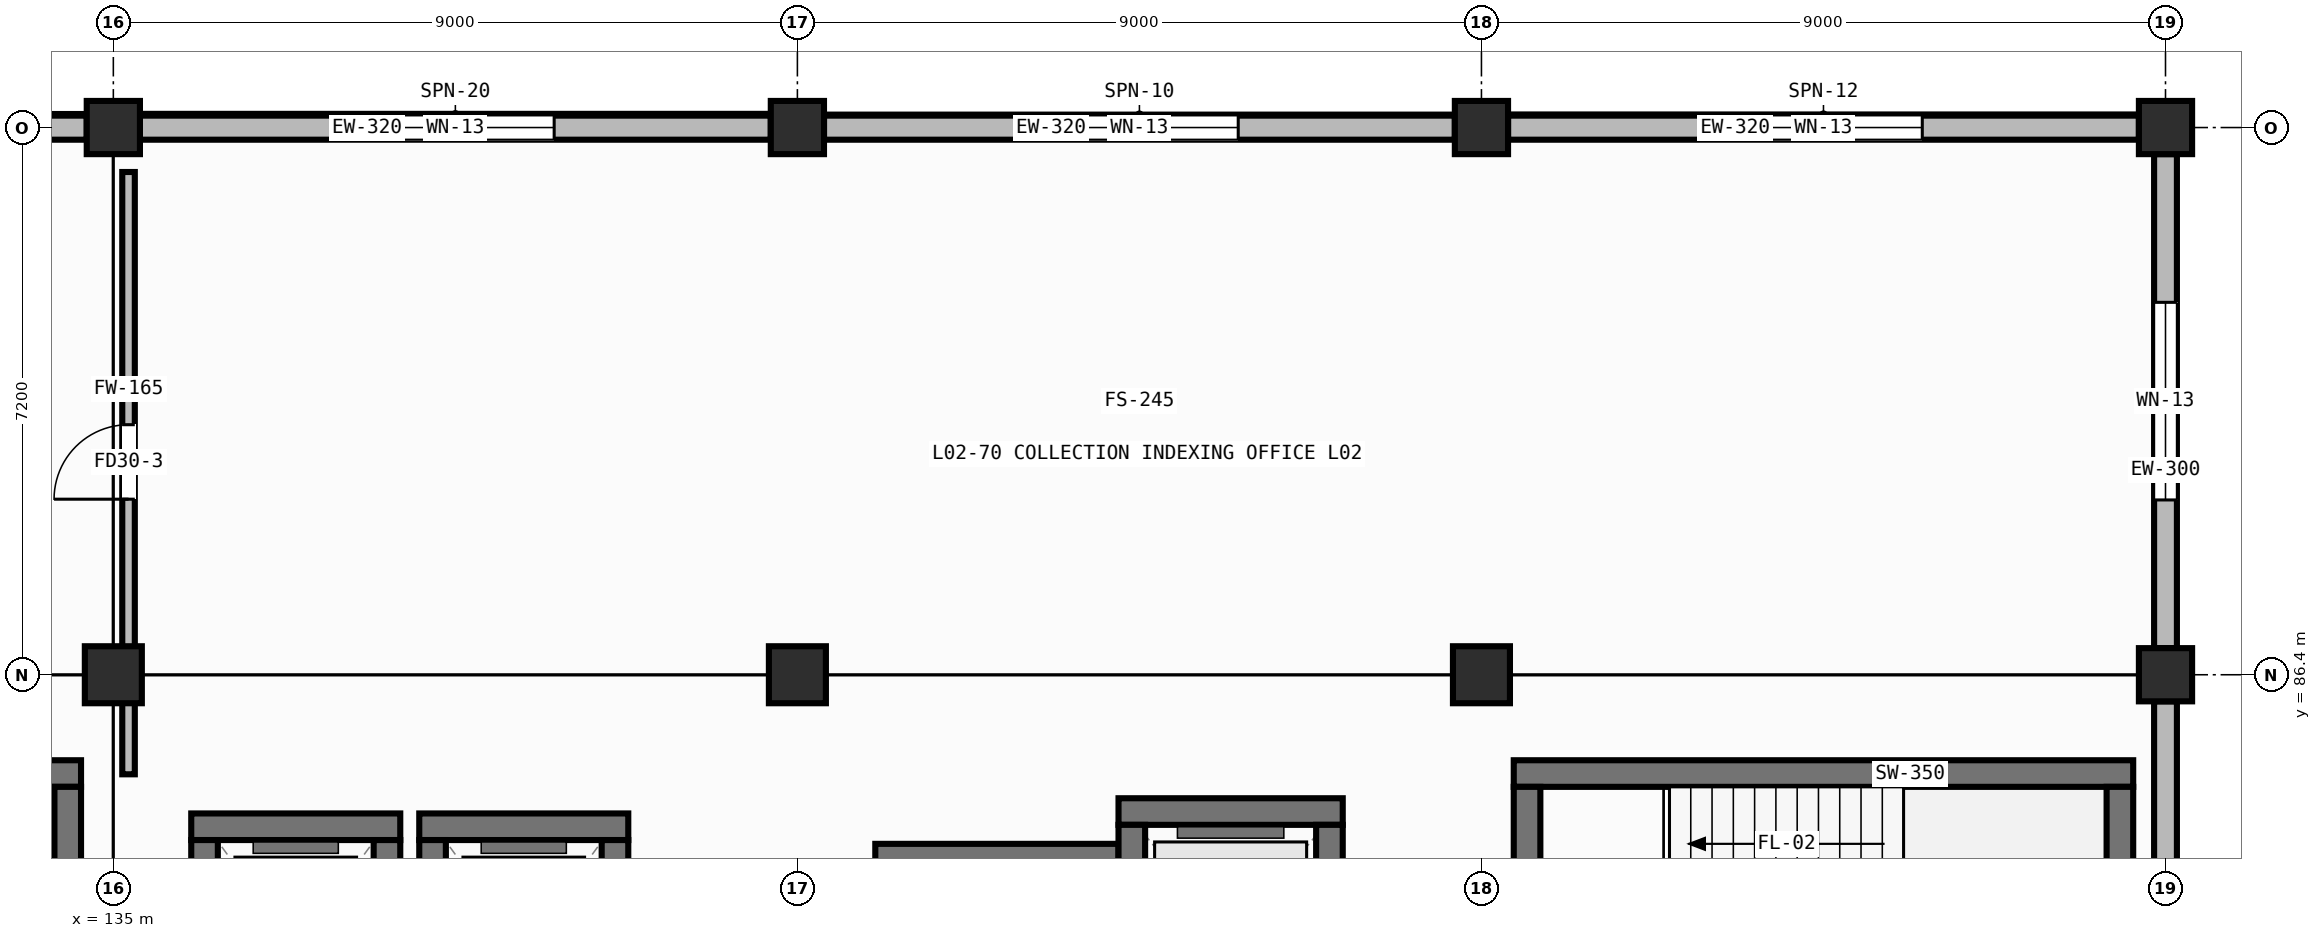
"""IFC4 building model, lengths in metres.
Left out: names, types, materials, properties, quantities, classifications, styles, units other than length and angle.
Written with IfcOpenShell. Run it as: python <this file> out.ifc"""

import sys

from ifc_helpers import new_model, si_unit, direction, frame, frame_2d, origin, origin_2d, place, context, subcontext, project, spatial, rectangle, hollow_rectangle, extrude, element, fill, save


model = new_model("IFC4")
c1 = context("Model", 3, precision=1e-05, world=origin(), true_north=direction((0.0, 1.0)))
c2 = subcontext(c1, "Body", "Model", "MODEL_VIEW")
j1 = project(units=[si_unit("LENGTHUNIT", "METRE"), si_unit("PLANEANGLEUNIT", "RADIAN")], contexts=[c1])
p1 = place(None, origin())
s1 = spatial("IfcSite", under=j1, at=p1, CompositionType="ELEMENT")
p2 = place(p1, origin())
s2 = spatial("IfcBuilding", under=s1, at=p2, CompositionType="ELEMENT")
p3 = place(p2, frame((0.0, 0.0, 4.8)))
s3 = spatial("IfcBuildingStorey", under=s2, at=p3, CompositionType="ELEMENT", Elevation=4.8)
p4 = place(p3, frame((135.0, 86.4, 0.0), z_axis=(0.0, 0.0, 1.0), x_axis=(1.0, 0.0, 0.0)))
e1 = element("IfcColumn", 1, at=p4, inside=s3, PredefinedType="COLUMN", context=c2, shape_type="SweptSolid", body=[
    extrude(hollow_rectangle(XDim=0.75, YDim=0.75, WallThickness=0.032, at=origin_2d()), origin(), (0.0, 0.0, 1.0), 4.0),
])
p5 = place(p3, frame((135.0, 93.6, 0.0), z_axis=(0.0, 0.0, 1.0), x_axis=(1.0, 0.0, 0.0)))
e2 = element("IfcColumn", 2, at=p5, inside=s3, PredefinedType="COLUMN", context=c2, shape_type="SweptSolid", body=[
    extrude(hollow_rectangle(XDim=0.7, YDim=0.7, WallThickness=0.028, at=origin_2d()), origin(), (0.0, 0.0, 1.0), 4.0),
])
p6 = place(p3, frame((144.0, 86.4, 0.0), z_axis=(0.0, 0.0, 1.0), x_axis=(1.0, 0.0, 0.0)))
e3 = element("IfcColumn", 3, at=p6, inside=s3, PredefinedType="COLUMN", context=c2, shape_type="SweptSolid", body=[
    extrude(hollow_rectangle(XDim=0.75, YDim=0.75, WallThickness=0.032, at=origin_2d()), origin(), (0.0, 0.0, 1.0), 4.0),
])
p7 = place(p3, frame((144.0, 93.6, 0.0), z_axis=(0.0, 0.0, 1.0), x_axis=(1.0, 0.0, 0.0)))
e4 = element("IfcColumn", 4, at=p7, inside=s3, PredefinedType="COLUMN", context=c2, shape_type="SweptSolid", body=[
    extrude(hollow_rectangle(XDim=0.7, YDim=0.7, WallThickness=0.028, at=origin_2d()), origin(), (0.0, 0.0, 1.0), 4.0),
])
p8 = place(p3, frame((153.0, 86.4, 0.0), z_axis=(0.0, 0.0, 1.0), x_axis=(1.0, 0.0, 0.0)))
e5 = element("IfcColumn", 5, at=p8, inside=s3, PredefinedType="COLUMN", context=c2, shape_type="SweptSolid", body=[
    extrude(hollow_rectangle(XDim=0.75, YDim=0.75, WallThickness=0.032, at=origin_2d()), origin(), (0.0, 0.0, 1.0), 4.0),
])
for number, where, z_axis, x_axis in (
    (6, (153.0, 93.6, 0.0), (0.0, 0.0, 1.0), (1.0, 0.0, 0.0)),
    (7, (162.0, 86.4, 0.0), (0.0, 0.0, 1.0), (1.0, 0.0, 0.0)),
    (8, (162.0, 93.6, 0.0), (0.0, 0.0, 1.0), (1.0, 0.0, 0.0)),
):
    element("IfcColumn", number, at=place(p3, frame(where, z_axis=z_axis, x_axis=x_axis)), inside=s3, PredefinedType="COLUMN", context=c2, shape_type="SweptSolid", body=[
        extrude(hollow_rectangle(XDim=0.7, YDim=0.7, WallThickness=0.028, at=origin_2d()), origin(), (0.0, 0.0, 1.0), 4.0),
    ])
p9 = place(p3, frame((134.65, 93.6, 0.0), z_axis=(0.0, 0.0, 1.0), x_axis=(-1.0, 0.0, 0.0)))
e9 = element("IfcWall", 9, at=p9, inside=s3, PredefinedType="STANDARD", context=c2, shape_type="SweptSolid", body=[
    extrude(rectangle(XDim=8.3, YDim=0.32, at=frame_2d((4.15, 0.0))), origin(), (0.0, 0.0, 1.0), 3.255),
])
p10 = place(p3, frame((143.65, 93.6, 0.0), z_axis=(0.0, 0.0, 1.0), x_axis=(-1.0, 0.0, 0.0)))
e10 = element("IfcWall", 10, at=p10, inside=s3, PredefinedType="STANDARD", context=c2, shape_type="SweptSolid", body=[
    extrude(rectangle(XDim=8.3, YDim=0.32, at=frame_2d((4.15, 0.0))), origin(), (0.0, 0.0, 1.0), 3.255),
])
p11 = place(p10, frame((2.85, 0.0, 0.85)))
e11 = element("IfcOpeningElement", 11, at=p11, cuts=e10, PredefinedType="OPENING", context=c2, shape_type="SweptSolid", body=[
    extrude(rectangle(XDim=2.6, YDim=1.6, at=frame_2d((1.3, 0.8))), frame((0.0, 0.172, 0.0), z_axis=(0.0, -1.0, 0.0), x_axis=(1.0, 0.0, 0.0)), (0.0, 0.0, 1.0), 0.344),
])
p12 = place(p3, frame((152.65, 93.6, 0.0), z_axis=(0.0, 0.0, 1.0), x_axis=(-1.0, 0.0, 0.0)))
e12 = element("IfcWall", 12, at=p12, inside=s3, PredefinedType="STANDARD", context=c2, shape_type="SweptSolid", body=[
    extrude(rectangle(XDim=8.3, YDim=0.32, at=frame_2d((4.15, 0.0))), origin(), (0.0, 0.0, 1.0), 3.255),
])
p13 = place(p12, frame((2.85, 0.0, 0.85)))
e13 = element("IfcOpeningElement", 13, at=p13, cuts=e12, PredefinedType="OPENING", context=c2, shape_type="SweptSolid", body=[
    extrude(rectangle(XDim=2.6, YDim=1.6, at=frame_2d((1.3, 0.8))), frame((0.0, 0.172, 0.0), z_axis=(0.0, -1.0, 0.0), x_axis=(1.0, 0.0, 0.0)), (0.0, 0.0, 1.0), 0.344),
])
p14 = place(p3, frame((161.65, 93.6, 0.0), z_axis=(0.0, 0.0, 1.0), x_axis=(-1.0, 0.0, 0.0)))
e14 = element("IfcWall", 14, at=p14, inside=s3, PredefinedType="STANDARD", context=c2, shape_type="SweptSolid", body=[
    extrude(rectangle(XDim=8.3, YDim=0.32, at=frame_2d((4.15, 0.0))), origin(), (0.0, 0.0, 1.0), 3.255),
])
p15 = place(p14, frame((2.85, 0.0, 0.85)))
e15 = element("IfcOpeningElement", 15, at=p15, cuts=e14, PredefinedType="OPENING", context=c2, shape_type="SweptSolid", body=[
    extrude(rectangle(XDim=2.6, YDim=1.6, at=frame_2d((1.3, 0.8))), frame((0.0, 0.172, 0.0), z_axis=(0.0, -1.0, 0.0), x_axis=(1.0, 0.0, 0.0)), (0.0, 0.0, 1.0), 0.344),
])
p16 = place(p3, frame((162.0, 86.05, 0.0), z_axis=(0.0, 0.0, 1.0), x_axis=(0.0, -1.0, 0.0)))
e16 = element("IfcWall", 16, at=p16, inside=s3, PredefinedType="STANDARD", context=c2, shape_type="SweptSolid", body=[
    extrude(rectangle(XDim=6.5, YDim=0.3, at=frame_2d((3.25, 0.0))), origin(), (0.0, 0.0, 1.0), 3.255),
])
p17 = place(p3, frame((162.0, 93.25, 0.0), z_axis=(0.0, 0.0, 1.0), x_axis=(0.0, -1.0, 0.0)))
e17 = element("IfcWall", 17, at=p17, inside=s3, PredefinedType="STANDARD", context=c2, shape_type="SweptSolid", body=[
    extrude(rectangle(XDim=6.5, YDim=0.3, at=frame_2d((3.25, 0.0))), origin(), (0.0, 0.0, 1.0), 3.255),
])
p18 = place(p17, frame((1.95, 0.0, 0.85)))
e18 = element("IfcOpeningElement", 18, at=p18, cuts=e17, PredefinedType="OPENING", context=c2, shape_type="SweptSolid", body=[
    extrude(rectangle(XDim=2.6, YDim=1.6, at=frame_2d((1.3, 0.8))), frame((0.0, 0.162, 0.0), z_axis=(0.0, -1.0, 0.0), x_axis=(1.0, 0.0, 0.0)), (0.0, 0.0, 1.0), 0.324),
])
p19 = place(p3, frame((126.425, 85.1, 0.0), z_axis=(0.0, 0.0, 1.0), x_axis=(1.0, 0.0, 0.0)))
e19 = element("IfcWall", 19, at=p19, inside=s3, PredefinedType="SHEAR", context=c2, shape_type="SweptSolid", body=[
    extrude(rectangle(XDim=8.15, YDim=0.35, at=frame_2d((4.075, 0.0))), origin(), (0.0, 0.0, 1.0), 3.755),
])
p20 = place(p3, frame((134.4, 81.375, 0.0), z_axis=(0.0, 0.0, 1.0), x_axis=(0.0, 1.0, 0.0)))
e20 = element("IfcWall", 20, at=p20, inside=s3, PredefinedType="SHEAR", context=c2, shape_type="SweptSolid", body=[
    extrude(rectangle(XDim=3.55, YDim=0.35, at=frame_2d((1.775, 0.0))), origin(), (0.0, 0.0, 1.0), 3.755),
])
p21 = place(p3, frame((153.425, 85.1, 0.0), z_axis=(0.0, 0.0, 1.0), x_axis=(1.0, 0.0, 0.0)))
e21 = element("IfcWall", 21, at=p21, inside=s3, PredefinedType="SHEAR", context=c2, shape_type="SweptSolid", body=[
    extrude(rectangle(XDim=8.15, YDim=0.35, at=frame_2d((4.075, 0.0))), origin(), (0.0, 0.0, 1.0), 3.755),
])
for number, where, z_axis, x_axis in (
    (22, (153.6, 81.375, 0.0), (0.0, 0.0, 1.0), (0.0, 1.0, 0.0)),
    (23, (161.4, 81.375, 0.0), (0.0, 0.0, 1.0), (0.0, 1.0, 0.0)),
):
    element("IfcWall", number, at=place(p3, frame(where, z_axis=z_axis, x_axis=x_axis)), inside=s3, PredefinedType="SHEAR", context=c2, shape_type="SweptSolid", body=[
        extrude(rectangle(XDim=3.55, YDim=0.35, at=frame_2d((1.775, 0.0))), origin(), (0.0, 0.0, 1.0), 3.755),
    ])
p22 = place(p3, frame((136.025, 84.4, 0.0), z_axis=(0.0, 0.0, 1.0), x_axis=(1.0, 0.0, 0.0)))
e24 = element("IfcWall", 24, at=p22, inside=s3, PredefinedType="SHEAR", context=c2, shape_type="SweptSolid", body=[
    extrude(rectangle(XDim=2.75, YDim=0.35, at=frame_2d((1.375, 0.0))), origin(), (0.0, 0.0, 1.0), 3.755),
])
for number, where, z_axis, x_axis in (
    (25, (136.2, 81.375, 0.0), (0.0, 0.0, 1.0), (0.0, 1.0, 0.0)),
    (26, (138.6, 81.375, 0.0), (0.0, 0.0, 1.0), (0.0, 1.0, 0.0)),
):
    element("IfcWall", number, at=place(p3, frame(where, z_axis=z_axis, x_axis=x_axis)), inside=s3, PredefinedType="SHEAR", context=c2, shape_type="SweptSolid", body=[
        extrude(rectangle(XDim=2.85, YDim=0.35, at=frame_2d((1.425, 0.0))), origin(), (0.0, 0.0, 1.0), 3.755),
    ])
p23 = place(p3, frame((139.025, 84.4, 0.0), z_axis=(0.0, 0.0, 1.0), x_axis=(1.0, 0.0, 0.0)))
e27 = element("IfcWall", 27, at=p23, inside=s3, PredefinedType="SHEAR", context=c2, shape_type="SweptSolid", body=[
    extrude(rectangle(XDim=2.75, YDim=0.35, at=frame_2d((1.375, 0.0))), origin(), (0.0, 0.0, 1.0), 3.755),
])
for number, where, z_axis, x_axis in (
    (28, (139.2, 81.375, 0.0), (0.0, 0.0, 1.0), (0.0, 1.0, 0.0)),
    (29, (141.6, 81.375, 0.0), (0.0, 0.0, 1.0), (0.0, 1.0, 0.0)),
):
    element("IfcWall", number, at=place(p3, frame(where, z_axis=z_axis, x_axis=x_axis)), inside=s3, PredefinedType="SHEAR", context=c2, shape_type="SweptSolid", body=[
        extrude(rectangle(XDim=2.85, YDim=0.35, at=frame_2d((1.425, 0.0))), origin(), (0.0, 0.0, 1.0), 3.755),
    ])
p24 = place(p3, frame((145.025, 84.0, 0.0), z_axis=(0.0, 0.0, 1.0), x_axis=(1.0, 0.0, 0.0)))
e30 = element("IfcWall", 30, at=p24, inside=s3, PredefinedType="SHEAR", context=c2, shape_type="SweptSolid", body=[
    extrude(rectangle(XDim=3.2, YDim=0.35, at=frame_2d((1.6, 0.0))), origin(), (0.0, 0.0, 1.0), 3.755),
])
p25 = place(p3, frame((148.225, 84.6, 0.0), z_axis=(0.0, 0.0, 1.0), x_axis=(1.0, 0.0, 0.0)))
e31 = element("IfcWall", 31, at=p25, inside=s3, PredefinedType="SHEAR", context=c2, shape_type="SweptSolid", body=[
    extrude(rectangle(XDim=2.95, YDim=0.35, at=frame_2d((1.475, 0.0))), origin(), (0.0, 0.0, 1.0), 3.755),
])
for number, where, z_axis, x_axis in (
    (32, (148.4, 81.375, 0.0), (0.0, 0.0, 1.0), (0.0, 1.0, 0.0)),
    (33, (151.0, 81.375, 0.0), (0.0, 0.0, 1.0), (0.0, 1.0, 0.0)),
):
    element("IfcWall", number, at=place(p3, frame(where, z_axis=z_axis, x_axis=x_axis)), inside=s3, PredefinedType="SHEAR", context=c2, shape_type="SweptSolid", body=[
        extrude(rectangle(XDim=3.05, YDim=0.35, at=frame_2d((1.525, 0.0))), origin(), (0.0, 0.0, 1.0), 3.755),
    ])
p26 = place(p3, frame((135.2, 85.09, 0.0), z_axis=(0.0, 0.0, 1.0), x_axis=(0.0, 1.0, 0.0)))
e34 = element("IfcWall", 34, at=p26, inside=s3, PredefinedType="PARTITIONING", context=c2, shape_type="SweptSolid", body=[
    extrude(rectangle(XDim=7.925, YDim=0.165, at=frame_2d((3.962, 0.0))), origin(), (0.0, 0.0, 1.0), 3.035),
])
p27 = place(p26, frame((3.62, 0.0, 0.0)))
e35 = element("IfcOpeningElement", 35, at=p27, cuts=e34, PredefinedType="OPENING", context=c2, shape_type="SweptSolid", body=[
    extrude(rectangle(XDim=0.98, YDim=2.02, at=frame_2d((0.49, 1.01))), frame((0.0, 0.094, 0.0), z_axis=(0.0, -1.0, 0.0), x_axis=(1.0, 0.0, 0.0)), (0.0, 0.0, 1.0), 0.189),
])
p28 = place(p11, origin())
e36 = element("IfcWindow", 36, at=p28, inside=s3, PartitioningType="DOUBLE_PANEL_VERTICAL", PredefinedType="WINDOW", context=c2, shape_type="SweptSolid", body=[
    extrude(rectangle(XDim=2.6, YDim=1.6, at=frame_2d((1.3, 0.8))), frame((0.0, 0.03, 0.0), z_axis=(0.0, -1.0, 0.0), x_axis=(1.0, 0.0, 0.0)), (0.0, 0.0, 1.0), 0.06),
])
fill(e11, e36)
p29 = place(p13, origin())
e37 = element("IfcWindow", 37, at=p29, inside=s3, PartitioningType="DOUBLE_PANEL_VERTICAL", PredefinedType="WINDOW", context=c2, shape_type="SweptSolid", body=[
    extrude(rectangle(XDim=2.6, YDim=1.6, at=frame_2d((1.3, 0.8))), frame((0.0, 0.03, 0.0), z_axis=(0.0, -1.0, 0.0), x_axis=(1.0, 0.0, 0.0)), (0.0, 0.0, 1.0), 0.06),
])
fill(e13, e37)
p30 = place(p15, origin())
e38 = element("IfcWindow", 38, at=p30, inside=s3, PartitioningType="DOUBLE_PANEL_VERTICAL", PredefinedType="WINDOW", context=c2, shape_type="SweptSolid", body=[
    extrude(rectangle(XDim=2.6, YDim=1.6, at=frame_2d((1.3, 0.8))), frame((0.0, 0.03, 0.0), z_axis=(0.0, -1.0, 0.0), x_axis=(1.0, 0.0, 0.0)), (0.0, 0.0, 1.0), 0.06),
])
fill(e15, e38)
p31 = place(p18, origin())
e39 = element("IfcWindow", 39, at=p31, inside=s3, PartitioningType="DOUBLE_PANEL_VERTICAL", PredefinedType="WINDOW", context=c2, shape_type="SweptSolid", body=[
    extrude(rectangle(XDim=2.6, YDim=1.6, at=frame_2d((1.3, 0.8))), frame((0.0, 0.03, 0.0), z_axis=(0.0, -1.0, 0.0), x_axis=(1.0, 0.0, 0.0)), (0.0, 0.0, 1.0), 0.06),
])
fill(e18, e39)
p32 = place(p27, origin())
e40 = element("IfcDoor", 40, at=p32, inside=s3, OperationType="SINGLE_SWING_LEFT", PredefinedType="DOOR", context=c2, shape_type="SweptSolid", body=[
    extrude(rectangle(XDim=0.98, YDim=2.02, at=frame_2d((0.49, 1.01))), frame((0.0, 0.025, 0.0), z_axis=(0.0, -1.0, 0.0), x_axis=(1.0, 0.0, 0.0)), (0.0, 0.0, 1.0), 0.05),
])
fill(e35, e40)
save(model, sys.argv[1])
